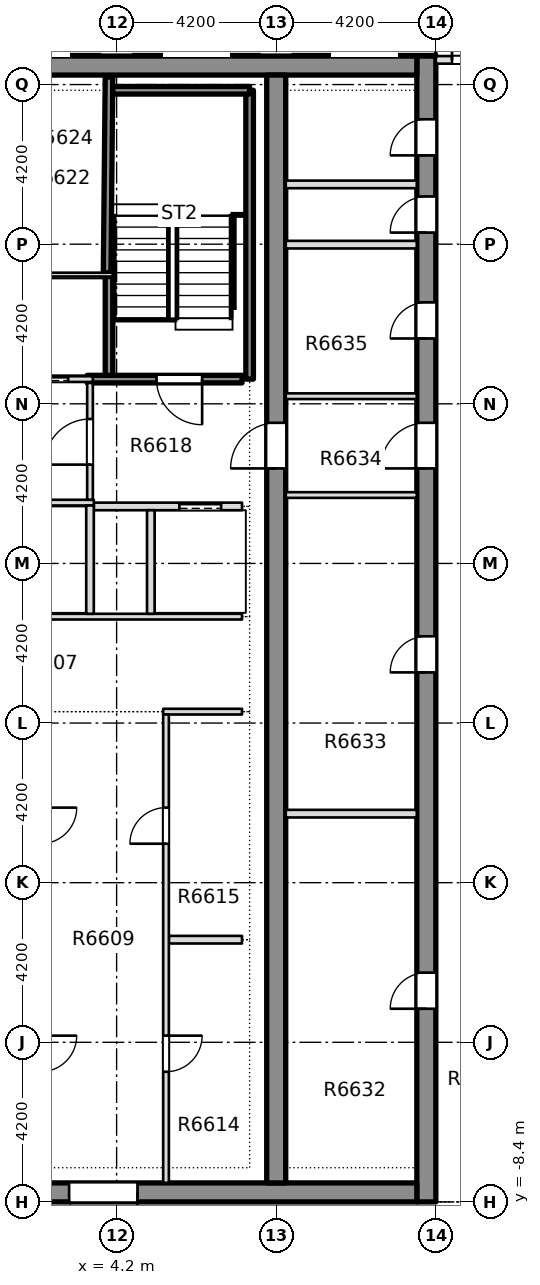
"""IFC4 building model, lengths in metres.
Left out: names, types, materials, properties, quantities, classifications, styles, units other than length and angle.
Written with IfcOpenShell. Run it as: python <this file> out.ifc"""

import sys

from ifc_helpers import new_model, si_unit, direction, frame, frame_2d, origin, place, context, subcontext, project, spatial, rectangle, extrude, element, fill, save


model = new_model("IFC4")
c1 = context("Model", 3, precision=1e-05, world=origin(), true_north=direction((0.0, 1.0)))
c2 = subcontext(c1, "Body", "Model", "MODEL_VIEW")
j1 = project(units=[si_unit("LENGTHUNIT", "METRE"), si_unit("PLANEANGLEUNIT", "RADIAN")], contexts=[c1])
p1 = place(None, origin())
s1 = spatial("IfcSite", under=j1, at=p1, CompositionType="ELEMENT")
p2 = place(p1, origin())
s2 = spatial("IfcBuilding", under=s1, at=p2, CompositionType="ELEMENT")
p3 = place(p2, frame((0.0, 0.0, 251.05)))
s3 = spatial("IfcBuildingStorey", under=s2, at=p3, CompositionType="ELEMENT", Elevation=251.05)
p4 = place(p3, frame((12.35, -8.4, -0.4), z_axis=(0.0, 0.0, 1.0), x_axis=(0.0, 1.0, 0.0)))
e1 = element("IfcWall", 1, at=p4, inside=s3, PredefinedType="SHEAR", context=c2, shape_type="SweptSolid", body=[
    extrude(rectangle(XDim=30.15, YDim=0.5, at=frame_2d((15.075, 0.0))), origin(), (0.0, 0.0, 1.0), 3.45),
])
p5 = place(p4, frame((5.083, 0.0, 0.4)))
e2 = element("IfcOpeningElement", 2, at=p5, cuts=e1, PredefinedType="OPENING", context=c2, shape_type="SweptSolid", body=[
    extrude(rectangle(XDim=0.95, YDim=2.1, at=frame_2d((0.475, 1.05))), frame((0.0, 0.26, 0.0), z_axis=(0.0, -1.0, 0.0), x_axis=(1.0, 0.0, 0.0)), (0.0, 0.0, 1.0), 0.52),
])
p6 = place(p4, frame((13.933, 0.0, 0.4)))
e3 = element("IfcOpeningElement", 3, at=p6, cuts=e1, PredefinedType="OPENING", context=c2, shape_type="SweptSolid", body=[
    extrude(rectangle(XDim=0.95, YDim=2.1, at=frame_2d((0.475, 1.05))), frame((0.0, 0.26, 0.0), z_axis=(0.0, -1.0, 0.0), x_axis=(1.0, 0.0, 0.0)), (0.0, 0.0, 1.0), 0.52),
])
p7 = place(p4, frame((22.719, 0.0, 0.4)))
e4 = element("IfcOpeningElement", 4, at=p7, cuts=e1, PredefinedType="OPENING", context=c2, shape_type="SweptSolid", body=[
    extrude(rectangle(XDim=0.95, YDim=2.1, at=frame_2d((0.475, 1.05))), frame((0.0, 0.26, 0.0), z_axis=(0.0, -1.0, 0.0), x_axis=(1.0, 0.0, 0.0)), (0.0, 0.0, 1.0), 0.52),
])
p8 = place(p4, frame((25.506, 0.0, 0.4)))
e5 = element("IfcOpeningElement", 5, at=p8, cuts=e1, PredefinedType="OPENING", context=c2, shape_type="SweptSolid", body=[
    extrude(rectangle(XDim=0.95, YDim=2.1, at=frame_2d((0.475, 1.05))), frame((0.0, 0.26, 0.0), z_axis=(0.0, -1.0, 0.0), x_axis=(1.0, 0.0, 0.0)), (0.0, 0.0, 1.0), 0.52),
])
p9 = place(p4, frame((27.537, 0.0, 0.4)))
e6 = element("IfcOpeningElement", 6, at=p9, cuts=e1, PredefinedType="OPENING", context=c2, shape_type="SweptSolid", body=[
    extrude(rectangle(XDim=0.95, YDim=2.1, at=frame_2d((0.475, 1.05))), frame((0.0, 0.26, 0.0), z_axis=(0.0, -1.0, 0.0), x_axis=(1.0, 0.0, 0.0)), (0.0, 0.0, 1.0), 0.52),
])
p10 = place(p4, frame((19.3, 0.0, 0.4)))
e7 = element("IfcOpeningElement", 7, at=p10, cuts=e1, PredefinedType="OPENING", context=c2, shape_type="SweptSolid", body=[
    extrude(rectangle(XDim=1.2, YDim=2.1, at=frame_2d((0.6, 1.05))), frame((0.0, 0.26, 0.0), z_axis=(0.0, -1.0, 0.0), x_axis=(1.0, 0.0, 0.0)), (0.0, 0.0, 1.0), 0.52),
])
p11 = place(p3, frame((-12.1, -8.15, -0.4), z_axis=(0.0, 0.0, 1.0), x_axis=(1.0, 0.0, 0.0)))
e8 = element("IfcWall", 8, at=p11, inside=s3, PredefinedType="SHEAR", context=c2, shape_type="SweptSolid", body=[
    extrude(rectangle(XDim=24.2, YDim=0.5, at=frame_2d((12.1, 0.0))), origin(), (0.0, 0.0, 1.0), 3.45),
])
p12 = place(p11, frame((7.35, 0.0, 0.4)))
e9 = element("IfcOpeningElement", 9, at=p12, cuts=e8, PredefinedType="OPENING", context=c2, shape_type="SweptSolid", body=[
    extrude(rectangle(XDim=1.8, YDim=2.1, at=frame_2d((0.9, 1.05))), frame((0.0, 0.26, 0.0), z_axis=(0.0, -1.0, 0.0), x_axis=(1.0, 0.0, 0.0)), (0.0, 0.0, 1.0), 0.52),
])
p13 = place(p11, frame((15.05, 0.0, 0.4)))
e10 = element("IfcOpeningElement", 10, at=p13, cuts=e8, PredefinedType="OPENING", context=c2, shape_type="SweptSolid", body=[
    extrude(rectangle(XDim=1.8, YDim=2.1, at=frame_2d((0.9, 1.05))), frame((0.0, 0.26, 0.0), z_axis=(0.0, -1.0, 0.0), x_axis=(1.0, 0.0, 0.0)), (0.0, 0.0, 1.0), 0.52),
])
p14 = place(p3, frame((-12.1, 21.5, -0.4), z_axis=(0.0, 0.0, 1.0), x_axis=(1.0, 0.0, 0.0)))
e11 = element("IfcWall", 11, at=p14, inside=s3, PredefinedType="SHEAR", context=c2, shape_type="SweptSolid", body=[
    extrude(rectangle(XDim=24.2, YDim=0.5, at=frame_2d((12.1, 0.0))), origin(), (0.0, 0.0, 1.0), 3.45),
])
p15 = place(p3, frame((8.4, -7.9, -0.4), z_axis=(0.0, 0.0, 1.0), x_axis=(0.0, 1.0, 0.0)))
e12 = element("IfcWall", 12, at=p15, inside=s3, PredefinedType="SHEAR", context=c2, shape_type="SweptSolid", body=[
    extrude(rectangle(XDim=29.15, YDim=0.5, at=frame_2d((14.575, 0.0))), origin(), (0.0, 0.0, 1.0), 3.45),
])
p16 = place(p15, frame((18.8, 0.0, 0.4)))
e13 = element("IfcOpeningElement", 13, at=p16, cuts=e12, PredefinedType="OPENING", context=c2, shape_type="SweptSolid", body=[
    extrude(rectangle(XDim=1.2, YDim=2.1, at=frame_2d((0.6, 1.05))), frame((0.0, 0.26, 0.0), z_axis=(0.0, -1.0, 0.0), x_axis=(1.0, 0.0, 0.0)), (0.0, 0.0, 1.0), 0.52),
])
p17 = place(p3, frame((16.35, 21.65, 0.0), z_axis=(0.0, 0.0, 1.0), x_axis=(-1.0, 0.0, 0.0)))
e14 = element("IfcWall", 14, at=p17, inside=s3, PredefinedType="STANDARD", context=c2, shape_type="SweptSolid", body=[
    extrude(rectangle(XDim=3.75, YDim=0.2, at=frame_2d((1.875, 0.0))), origin(), (0.0, 0.0, 1.0), 3.05),
])
p18 = place(p17, frame((2.325, 0.0, 0.0)))
e15 = element("IfcOpeningElement", 15, at=p18, cuts=e14, PredefinedType="OPENING", context=c2, shape_type="SweptSolid", body=[
    extrude(rectangle(XDim=1.0, YDim=2.4, at=frame_2d((0.5, 1.2))), frame((0.0, 0.11, 0.0), z_axis=(0.0, -1.0, 0.0), x_axis=(1.0, 0.0, 0.0)), (0.0, 0.0, 1.0), 0.22),
])
p19 = place(p3, frame((5.575, -1.5, 0.0), z_axis=(0.0, 0.0, 1.0), x_axis=(1.0, 0.0, 0.0)))
e16 = element("IfcWall", 16, at=p19, inside=s3, PredefinedType="PARTITIONING", context=c2, shape_type="SweptSolid", body=[
    extrude(rectangle(XDim=1.925, YDim=0.2, at=frame_2d((0.962, 0.0))), origin(), (0.0, 0.0, 1.0), 3.05),
])
p20 = place(p3, frame((5.425, 4.5, 0.0), z_axis=(0.0, 0.0, 1.0), x_axis=(1.0, 0.0, 0.0)))
e17 = element("IfcWall", 17, at=p20, inside=s3, PredefinedType="PARTITIONING", context=c2, shape_type="SweptSolid", body=[
    extrude(rectangle(XDim=2.075, YDim=0.15, at=frame_2d((1.038, 0.0))), origin(), (0.0, 0.0, 1.0), 3.05),
])
p21 = place(p3, frame((-7.5, 7.0, 0.0), z_axis=(0.0, 0.0, 1.0), x_axis=(1.0, 0.0, 0.0)))
e18 = element("IfcWall", 18, at=p21, inside=s3, PredefinedType="PARTITIONING", context=c2, shape_type="SweptSolid", body=[
    extrude(rectangle(XDim=15.0, YDim=0.15, at=frame_2d((7.5, 0.0))), origin(), (0.0, 0.0, 1.0), 3.05),
])
p22 = place(p21, frame((6.8, 0.0, 0.0)))
e19 = element("IfcOpeningElement", 19, at=p22, cuts=e18, PredefinedType="OPENING", context=c2, shape_type="SweptSolid", body=[
    extrude(rectangle(XDim=1.4, YDim=2.1, at=frame_2d((0.7, 1.05))), frame((0.0, 0.085, 0.0), z_axis=(0.0, -1.0, 0.0), x_axis=(1.0, 0.0, 0.0)), (0.0, 0.0, 1.0), 0.17),
])
p23 = place(p3, frame((3.6, 9.9, 0.0), z_axis=(0.0, 0.0, 1.0), x_axis=(1.0, 0.0, 0.0)))
e20 = element("IfcWall", 20, at=p23, inside=s3, PredefinedType="PARTITIONING", context=c2, shape_type="SweptSolid", body=[
    extrude(rectangle(XDim=3.9, YDim=0.2, at=frame_2d((1.95, 0.0))), origin(), (0.0, 0.0, 1.0), 3.05),
])
p24 = place(p23, frame((2.25, 0.0, 0.0)))
e21 = element("IfcOpeningElement", 21, at=p24, cuts=e20, PredefinedType="OPENING", context=c2, shape_type="SweptSolid", body=[
    extrude(rectangle(XDim=1.1, YDim=2.1, at=frame_2d((0.55, 1.05))), frame((0.0, 0.11, 0.0), z_axis=(0.0, -1.0, 0.0), x_axis=(1.0, 0.0, 0.0)), (0.0, 0.0, 1.0), 0.22),
])
p25 = place(p3, frame((-3.6, 10.0, 0.0), z_axis=(0.0, 0.0, 1.0), x_axis=(1.0, 0.0, 0.0)))
e22 = element("IfcWall", 22, at=p25, inside=s3, PredefinedType="PARTITIONING", context=c2, shape_type="SweptSolid", body=[
    extrude(rectangle(XDim=7.2, YDim=0.15, at=frame_2d((3.6, 0.0))), origin(), (0.0, 0.0, 1.0), 3.05),
])
p26 = place(p25, frame((2.9, 0.0, 0.0)))
e23 = element("IfcOpeningElement", 23, at=p26, cuts=e22, PredefinedType="OPENING", context=c2, shape_type="SweptSolid", body=[
    extrude(rectangle(XDim=1.4, YDim=2.1, at=frame_2d((0.7, 1.05))), frame((0.0, 0.085, 0.0), z_axis=(0.0, -1.0, 0.0), x_axis=(1.0, 0.0, 0.0)), (0.0, 0.0, 1.0), 0.17),
])
p27 = place(p3, frame((-3.575, 13.25, 0.0), z_axis=(0.0, 0.0, 1.0), x_axis=(1.0, 0.0, 0.0)))
e24 = element("IfcWall", 24, at=p27, inside=s3, PredefinedType="PARTITIONING", context=c2, shape_type="SweptSolid", body=[
    extrude(rectangle(XDim=7.15, YDim=0.15, at=frame_2d((3.575, 0.0))), origin(), (0.0, 0.0, 1.0), 3.05),
])
p28 = place(p27, frame((0.6, 0.0, 0.0)))
e25 = element("IfcOpeningElement", 25, at=p28, cuts=e24, PredefinedType="OPENING", context=c2, shape_type="SweptSolid", body=[
    extrude(rectangle(XDim=1.2, YDim=2.1, at=frame_2d((0.6, 1.05))), frame((0.0, 0.085, 0.0), z_axis=(0.0, -1.0, 0.0), x_axis=(1.0, 0.0, 0.0)), (0.0, 0.0, 1.0), 0.17),
])
p29 = place(p27, frame((5.4, 0.0, 0.0)))
e26 = element("IfcOpeningElement", 26, at=p29, cuts=e24, PredefinedType="OPENING", context=c2, shape_type="SweptSolid", body=[
    extrude(rectangle(XDim=1.1, YDim=2.1, at=frame_2d((0.55, 1.05))), frame((0.0, 0.085, 0.0), z_axis=(0.0, -1.0, 0.0), x_axis=(1.0, 0.0, 0.0)), (0.0, 0.0, 1.0), 0.17),
])
p30 = place(p27, frame((2.975, 0.0, 0.0)))
e27 = element("IfcOpeningElement", 27, at=p30, cuts=e24, PredefinedType="OPENING", context=c2, shape_type="SweptSolid", body=[
    extrude(rectangle(XDim=1.2, YDim=2.1, at=frame_2d((0.6, 1.05))), frame((0.0, 0.085, 0.0), z_axis=(0.0, -1.0, 0.0), x_axis=(1.0, 0.0, 0.0)), (0.0, 0.0, 1.0), 0.17),
])
p31 = place(p3, frame((3.425, 13.25, 0.0), z_axis=(0.0, 0.0, 1.0), x_axis=(1.0, 0.0, 0.0)))
e28 = element("IfcWall", 28, at=p31, inside=s3, PredefinedType="SOLIDWALL", context=c2, shape_type="SweptSolid", body=[
    extrude(rectangle(XDim=4.075, YDim=0.2, at=frame_2d((2.038, 0.0))), origin(), (0.0, 0.0, 1.0), 3.05),
])
p32 = place(p31, frame((1.825, 0.0, 0.0)))
e29 = element("IfcOpeningElement", 29, at=p32, cuts=e28, PredefinedType="OPENING", context=c2, shape_type="SweptSolid", body=[
    extrude(rectangle(XDim=1.2, YDim=2.1, at=frame_2d((0.6, 1.05))), frame((0.0, 0.11, 0.0), z_axis=(0.0, -1.0, 0.0), x_axis=(1.0, 0.0, 0.0)), (0.0, 0.0, 1.0), 0.22),
])
p33 = place(p3, frame((0.65, 16.0, 0.0), z_axis=(0.0, 0.0, 1.0), x_axis=(1.0, 0.0, 0.0)))
e30 = element("IfcWall", 30, at=p33, inside=s3, PredefinedType="PARTITIONING", context=c2, shape_type="SweptSolid", body=[
    extrude(rectangle(XDim=3.45, YDim=0.1, at=frame_2d((1.725, 0.0))), origin(), (0.0, 0.0, 1.0), 3.05),
])
p34 = place(p3, frame((3.5, 7.075, 0.0), z_axis=(0.0, 0.0, 1.0), x_axis=(0.0, 1.0, 0.0)))
e31 = element("IfcWall", 31, at=p34, inside=s3, PredefinedType="PARTITIONING", context=c2, shape_type="SweptSolid", body=[
    extrude(rectangle(XDim=2.85, YDim=0.2, at=frame_2d((1.425, 0.0))), origin(), (0.0, 0.0, 1.0), 3.05),
])
p35 = place(p3, frame((3.5, 10.075, 0.0), z_axis=(0.0, 0.0, 1.0), x_axis=(0.0, 1.0, 0.0)))
e32 = element("IfcWall", 32, at=p35, inside=s3, PredefinedType="PARTITIONING", context=c2, shape_type="SweptSolid", body=[
    extrude(rectangle(XDim=3.075, YDim=0.15, at=frame_2d((1.538, 0.0))), origin(), (0.0, 0.0, 1.0), 3.05),
])
p36 = place(p35, frame((0.925, 0.0, 0.0)))
e33 = element("IfcOpeningElement", 33, at=p36, cuts=e32, PredefinedType="OPENING", context=c2, shape_type="SweptSolid", body=[
    extrude(rectangle(XDim=1.2, YDim=2.1, at=frame_2d((0.6, 1.05))), frame((0.0, 0.085, 0.0), z_axis=(0.0, -1.0, 0.0), x_axis=(1.0, 0.0, 0.0)), (0.0, 0.0, 1.0), 0.17),
])
p37 = place(p3, frame((4.0, 13.35, 0.0), z_axis=(0.0, 0.0, 1.0), x_axis=(0.0, 1.0, 0.0)))
e34 = element("IfcWall", 34, at=p37, inside=s3, PredefinedType="SOLIDWALL", context=c2, shape_type="SweptSolid", body=[
    extrude(rectangle(XDim=2.6, YDim=0.2, at=frame_2d((1.3, 0.0))), origin(), (0.0, 0.0, 1.0), 3.05),
])
p38 = place(p3, frame((3.95, 16.05, 0.0), z_axis=(0.0, 0.0, 1.0), x_axis=(0.009719787395, 0.999952761751, 0.0)))
e35 = element("IfcWall", 35, at=p38, inside=s3, PredefinedType="SOLIDWALL", context=c2, shape_type="SweptSolid", body=[
    extrude(rectangle(XDim=5.149, YDim=0.2, at=frame_2d((2.575, 0.0))), origin(), (0.0, 0.0, 1.0), 3.05),
])
p39 = place(p3, frame((5.1, 7.075, 0.0), z_axis=(0.0, 0.0, 1.0), x_axis=(0.0, 1.0, 0.0)))
e36 = element("IfcWall", 36, at=p39, inside=s3, PredefinedType="PARTITIONING", context=c2, shape_type="SweptSolid", body=[
    extrude(rectangle(XDim=2.725, YDim=0.2, at=frame_2d((1.363, 0.0))), origin(), (0.0, 0.0, 1.0), 3.05),
])
p40 = place(p3, frame((5.5, -7.899, 0.0), z_axis=(0.0, 0.0, 1.0), x_axis=(0.0, 1.0, 0.0)))
e37 = element("IfcWall", 37, at=p40, inside=s3, PredefinedType="PARTITIONING", context=c2, shape_type="SweptSolid", body=[
    extrude(rectangle(XDim=12.324, YDim=0.15, at=frame_2d((6.162, 0.0))), origin(), (0.0, 0.0, 1.0), 3.05),
])
p41 = place(p40, frame((2.924, 0.0, 0.0)))
e38 = element("IfcOpeningElement", 38, at=p41, cuts=e37, PredefinedType="OPENING", context=c2, shape_type="SweptSolid", body=[
    extrude(rectangle(XDim=0.95, YDim=2.1, at=frame_2d((0.475, 1.05))), frame((0.0, 0.085, 0.0), z_axis=(0.0, -1.0, 0.0), x_axis=(1.0, 0.0, 0.0)), (0.0, 0.0, 1.0), 0.17),
])
p42 = place(p40, frame((8.924, 0.0, 0.0)))
e39 = element("IfcOpeningElement", 39, at=p42, cuts=e37, PredefinedType="OPENING", context=c2, shape_type="SweptSolid", body=[
    extrude(rectangle(XDim=0.95, YDim=2.1, at=frame_2d((0.475, 1.05))), frame((0.0, 0.085, 0.0), z_axis=(0.0, -1.0, 0.0), x_axis=(1.0, 0.0, 0.0)), (0.0, 0.0, 1.0), 0.17),
])
p43 = place(p3, frame((8.651, 1.816, 0.0), z_axis=(0.0, 0.0, 1.0), x_axis=(1.0, 0.0, 0.0)))
e40 = element("IfcWall", 40, at=p43, inside=s3, PredefinedType="PARTITIONING", context=c2, shape_type="SweptSolid", body=[
    extrude(rectangle(XDim=3.448, YDim=0.2, at=frame_2d((1.724, 0.0))), origin(), (0.0, 0.0, 1.0), 3.05),
])
for number, where, z_axis, x_axis in (
    (41, (8.651, 10.2, 0.0), (0.0, 0.0, 1.0), (1.0, 0.0, 0.0)),
    (42, (8.651, 12.8, 0.0), (0.0, 0.0, 1.0), (1.0, 0.0, 0.0)),
):
    element("IfcWall", number, at=place(p3, frame(where, z_axis=z_axis, x_axis=x_axis)), inside=s3, PredefinedType="PARTITIONING", context=c2, shape_type="SweptSolid", body=[
        extrude(rectangle(XDim=3.448, YDim=0.15, at=frame_2d((1.724, 0.0))), origin(), (0.0, 0.0, 1.0), 3.05),
    ])
for number, where, z_axis, x_axis in (
    (43, (8.651, 16.788, 0.0), (0.0, 0.0, 1.0), (1.0, 0.0, 0.0)),
    (44, (8.651, 18.373, 0.0), (0.0, 0.0, 1.0), (1.0, 0.0, 0.0)),
):
    element("IfcWall", number, at=place(p3, frame(where, z_axis=z_axis, x_axis=x_axis)), inside=s3, PredefinedType="PARTITIONING", context=c2, shape_type="SweptSolid", body=[
        extrude(rectangle(XDim=3.448, YDim=0.2, at=frame_2d((1.724, 0.0))), origin(), (0.0, 0.0, 1.0), 3.05),
    ])
p44 = place(p3, frame((7.7, 13.25, 0.0), z_axis=(0.0, 0.0, 1.0), x_axis=(0.0, 1.0, 0.0)))
e45 = element("IfcWall", 45, at=p44, inside=s3, PredefinedType="SOLIDWALL", context=c2, shape_type="SweptSolid", body=[
    extrude(rectangle(XDim=7.6, YDim=0.2, at=frame_2d((3.8, 0.0))), origin(), (0.0, 0.0, 1.0), 3.05),
])
p45 = place(p3, frame((4.1, 20.85, 0.0), z_axis=(0.0, 0.0, 1.0), x_axis=(1.0, 0.0, 0.0)))
e46 = element("IfcWall", 46, at=p45, inside=s3, PredefinedType="SOLIDWALL", context=c2, shape_type="SweptSolid", body=[
    extrude(rectangle(XDim=3.6, YDim=0.2, at=frame_2d((1.8, 0.0))), origin(), (0.0, 0.0, 1.0), 3.05),
])
p46 = place(p18, origin())
e47 = element("IfcDoor", 47, at=p46, inside=s3, OperationType="SINGLE_SWING_LEFT", PredefinedType="DOOR", context=c2, shape_type="SweptSolid", body=[
    extrude(rectangle(XDim=1.0, YDim=2.4, at=frame_2d((0.5, 1.2))), frame((0.0, 0.025, 0.0), z_axis=(0.0, -1.0, 0.0), x_axis=(1.0, 0.0, 0.0)), (0.0, 0.0, 1.0), 0.05),
])
fill(e15, e47)
p47 = place(p41, origin())
e48 = element("IfcDoor", 48, at=p47, inside=s3, OperationType="SINGLE_SWING_LEFT", PredefinedType="DOOR", context=c2, shape_type="SweptSolid", body=[
    extrude(rectangle(XDim=0.95, YDim=2.1, at=frame_2d((0.475, 1.05))), frame((0.0, 0.025, 0.0), z_axis=(0.0, -1.0, 0.0), x_axis=(1.0, 0.0, 0.0)), (0.0, 0.0, 1.0), 0.05),
])
fill(e38, e48)
p48 = place(p42, origin())
e49 = element("IfcDoor", 49, at=p48, inside=s3, OperationType="SINGLE_SWING_LEFT", PredefinedType="DOOR", context=c2, shape_type="SweptSolid", body=[
    extrude(rectangle(XDim=0.95, YDim=2.1, at=frame_2d((0.475, 1.05))), frame((0.0, 0.025, 0.0), z_axis=(0.0, -1.0, 0.0), x_axis=(1.0, 0.0, 0.0)), (0.0, 0.0, 1.0), 0.05),
])
fill(e39, e49)
p49 = place(p32, origin())
e50 = element("IfcDoor", 50, at=p49, inside=s3, OperationType="SINGLE_SWING_RIGHT", PredefinedType="DOOR", context=c2, shape_type="SweptSolid", body=[
    extrude(rectangle(XDim=1.2, YDim=2.1, at=frame_2d((0.6, 1.05))), frame((0.0, 0.025, 0.0), z_axis=(0.0, -1.0, 0.0), x_axis=(1.0, 0.0, 0.0)), (0.0, 0.0, 1.0), 0.05),
])
fill(e29, e50)
p50 = place(p24, origin())
e51 = element("IfcDoor", 51, at=p50, inside=s3, OperationType="SLIDING_TO_LEFT", PredefinedType="DOOR", context=c2, shape_type="SweptSolid", body=[
    extrude(rectangle(XDim=1.1, YDim=2.1, at=frame_2d((0.55, 1.05))), frame((0.0, 0.025, 0.0), z_axis=(0.0, -1.0, 0.0), x_axis=(1.0, 0.0, 0.0)), (0.0, 0.0, 1.0), 0.05),
])
fill(e21, e51)
p51 = place(p29, origin())
e52 = element("IfcDoor", 52, at=p51, inside=s3, OperationType="SLIDING_TO_LEFT", PredefinedType="DOOR", context=c2, shape_type="SweptSolid", body=[
    extrude(rectangle(XDim=1.1, YDim=2.1, at=frame_2d((0.55, 1.05))), frame((0.0, 0.025, 0.0), z_axis=(0.0, -1.0, 0.0), x_axis=(1.0, 0.0, 0.0)), (0.0, 0.0, 1.0), 0.05),
])
fill(e26, e52)
p52 = place(p36, origin())
e53 = element("IfcDoor", 53, at=p52, inside=s3, OperationType="SINGLE_SWING_LEFT", PredefinedType="DOOR", context=c2, shape_type="SweptSolid", body=[
    extrude(rectangle(XDim=1.2, YDim=2.1, at=frame_2d((0.6, 1.05))), frame((0.0, 0.025, 0.0), z_axis=(0.0, -1.0, 0.0), x_axis=(1.0, 0.0, 0.0)), (0.0, 0.0, 1.0), 0.05),
])
fill(e33, e53)
p53 = place(p13, origin())
e54 = element("IfcDoor", 54, at=p53, inside=s3, OperationType="SINGLE_SWING_LEFT", PredefinedType="DOOR", context=c2, shape_type="SweptSolid", body=[
    extrude(rectangle(XDim=1.8, YDim=2.1, at=frame_2d((0.9, 1.05))), frame((0.0, 0.025, 0.0), z_axis=(0.0, -1.0, 0.0), x_axis=(1.0, 0.0, 0.0)), (0.0, 0.0, 1.0), 0.05),
])
fill(e10, e54)
p54 = place(p5, origin())
e55 = element("IfcDoor", 55, at=p54, inside=s3, OperationType="SINGLE_SWING_LEFT", PredefinedType="DOOR", context=c2, shape_type="SweptSolid", body=[
    extrude(rectangle(XDim=0.95, YDim=2.1, at=frame_2d((0.475, 1.05))), frame((0.0, 0.025, 0.0), z_axis=(0.0, -1.0, 0.0), x_axis=(1.0, 0.0, 0.0)), (0.0, 0.0, 1.0), 0.05),
])
fill(e2, e55)
p55 = place(p6, origin())
e56 = element("IfcDoor", 56, at=p55, inside=s3, OperationType="SINGLE_SWING_LEFT", PredefinedType="DOOR", context=c2, shape_type="SweptSolid", body=[
    extrude(rectangle(XDim=0.95, YDim=2.1, at=frame_2d((0.475, 1.05))), frame((0.0, 0.025, 0.0), z_axis=(0.0, -1.0, 0.0), x_axis=(1.0, 0.0, 0.0)), (0.0, 0.0, 1.0), 0.05),
])
fill(e3, e56)
p56 = place(p7, origin())
e57 = element("IfcDoor", 57, at=p56, inside=s3, OperationType="SINGLE_SWING_LEFT", PredefinedType="DOOR", context=c2, shape_type="SweptSolid", body=[
    extrude(rectangle(XDim=0.95, YDim=2.1, at=frame_2d((0.475, 1.05))), frame((0.0, 0.025, 0.0), z_axis=(0.0, -1.0, 0.0), x_axis=(1.0, 0.0, 0.0)), (0.0, 0.0, 1.0), 0.05),
])
fill(e4, e57)
p57 = place(p8, origin())
e58 = element("IfcDoor", 58, at=p57, inside=s3, OperationType="SINGLE_SWING_LEFT", PredefinedType="DOOR", context=c2, shape_type="SweptSolid", body=[
    extrude(rectangle(XDim=0.95, YDim=2.1, at=frame_2d((0.475, 1.05))), frame((0.0, 0.025, 0.0), z_axis=(0.0, -1.0, 0.0), x_axis=(1.0, 0.0, 0.0)), (0.0, 0.0, 1.0), 0.05),
])
fill(e5, e58)
p58 = place(p9, origin())
e59 = element("IfcDoor", 59, at=p58, inside=s3, OperationType="SINGLE_SWING_LEFT", PredefinedType="DOOR", context=c2, shape_type="SweptSolid", body=[
    extrude(rectangle(XDim=0.95, YDim=2.1, at=frame_2d((0.475, 1.05))), frame((0.0, 0.025, 0.0), z_axis=(0.0, -1.0, 0.0), x_axis=(1.0, 0.0, 0.0)), (0.0, 0.0, 1.0), 0.05),
])
fill(e6, e59)
p59 = place(p10, origin())
e60 = element("IfcDoor", 60, at=p59, inside=s3, OperationType="SINGLE_SWING_LEFT", PredefinedType="DOOR", context=c2, shape_type="SweptSolid", body=[
    extrude(rectangle(XDim=1.2, YDim=2.1, at=frame_2d((0.6, 1.05))), frame((0.0, 0.025, 0.0), z_axis=(0.0, -1.0, 0.0), x_axis=(1.0, 0.0, 0.0)), (0.0, 0.0, 1.0), 0.05),
])
fill(e7, e60)
p60 = place(p16, origin())
e61 = element("IfcDoor", 61, at=p60, inside=s3, OperationType="SINGLE_SWING_LEFT", PredefinedType="DOOR", context=c2, shape_type="SweptSolid", body=[
    extrude(rectangle(XDim=1.2, YDim=2.1, at=frame_2d((0.6, 1.05))), frame((0.0, 0.025, 0.0), z_axis=(0.0, -1.0, 0.0), x_axis=(1.0, 0.0, 0.0)), (0.0, 0.0, 1.0), 0.05),
])
fill(e13, e61)
save(model, sys.argv[1])
